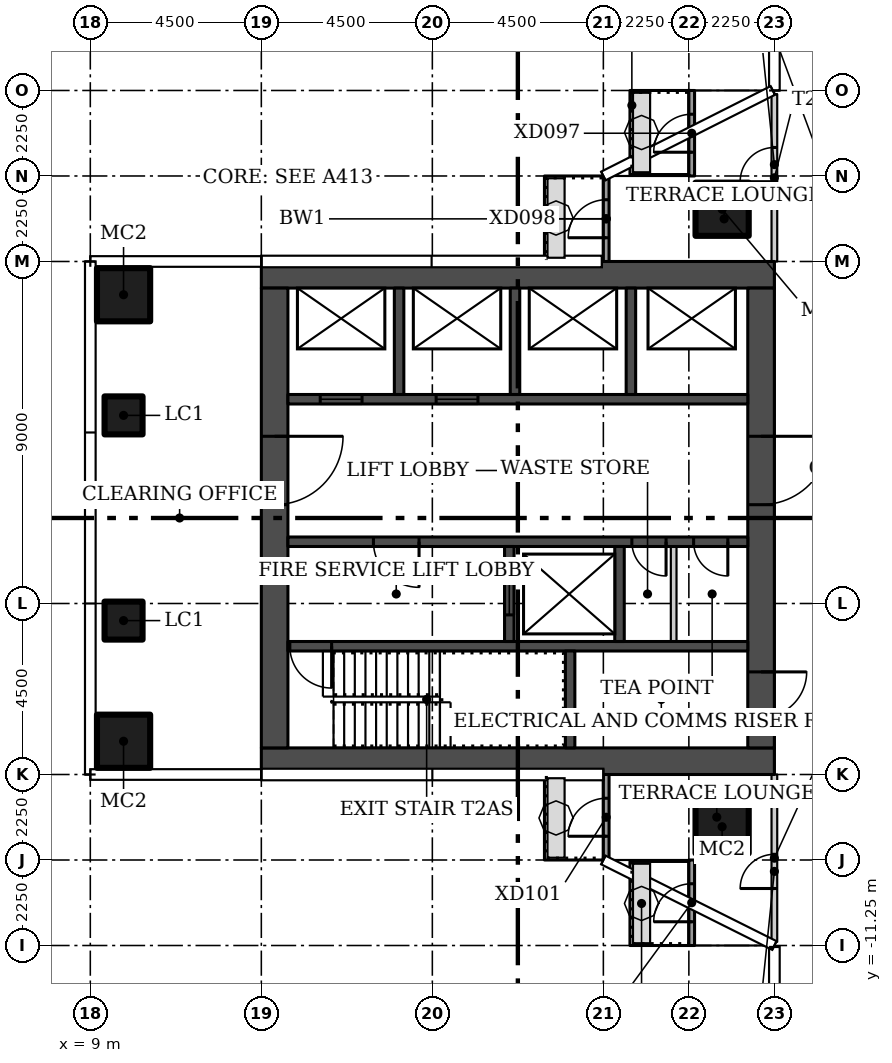
"""IFC4 building model, lengths in metres.
Left out: names, types, materials, properties, quantities, classifications, styles, units other than length and angle.
Written with IfcOpenShell. Run it as: python <this file> out.ifc"""

import sys

from ifc_helpers import new_model, si_unit, direction, frame, frame_2d, origin, origin_2d, place, context, subcontext, project, spatial, rectangle, hollow_rectangle, extrude, element, fill, save


model = new_model("IFC4")
c1 = context("Model", 3, precision=1e-05, world=origin(), true_north=direction((0.0, 1.0)))
c2 = subcontext(c1, "Body", "Model", "MODEL_VIEW")
j1 = project(units=[si_unit("LENGTHUNIT", "METRE"), si_unit("PLANEANGLEUNIT", "RADIAN")], contexts=[c1])
p1 = place(None, origin())
s1 = spatial("IfcSite", under=j1, at=p1, CompositionType="ELEMENT")
p2 = place(p1, origin())
s2 = spatial("IfcBuilding", under=s1, at=p2, CompositionType="ELEMENT")
p3 = place(p2, frame((0.0, 0.0, 73.2)))
s3 = spatial("IfcBuildingStorey", under=s2, at=p3, CompositionType="ELEMENT", Elevation=73.2)
for number, where in (
    (1, (25.625, 8.125, 0.0)),
    (2, (25.625, -8.125, 0.0)),
    (3, (9.875, -5.875, 0.0)),
    (4, (9.875, 5.875, 0.0)),
):
    element("IfcColumn", number, at=place(p3, frame(where)), inside=s3, PredefinedType="COLUMN", context=c2, shape_type="SweptSolid", body=[
        extrude(hollow_rectangle(XDim=1.4, YDim=1.4, WallThickness=0.05, at=origin_2d()), origin(), (0.0, 0.0, 1.0), 3.45),
    ])
for number, where in (
    (5, (9.875, -2.7, 0.0)),
    (6, (9.875, 2.7, 0.0)),
):
    element("IfcColumn", number, at=place(p3, frame(where)), inside=s3, PredefinedType="COLUMN", context=c2, shape_type="SweptSolid", body=[
        extrude(hollow_rectangle(XDim=1.0, YDim=1.0, WallThickness=0.04, at=origin_2d()), origin(), (0.0, 0.0, 1.0), 3.45),
    ])
p4 = place(p3, frame((27.0, 6.75, 0.0), z_axis=(0.0, 0.0, 1.0), x_axis=(0.0, 1.0, 0.0)))
e7 = element("IfcWall", 7, at=p4, inside=s3, PredefinedType="PARTITIONING", context=c2, shape_type="SweptSolid", body=[
    extrude(rectangle(XDim=4.405, YDim=0.15, at=frame_2d((2.203, 0.0))), origin(), (0.0, 0.0, 1.0), 3.45),
])
p5 = place(p4, frame((2.1, 0.0, 0.0)))
e8 = element("IfcOpeningElement", 8, at=p5, cuts=e7, PredefinedType="OPENING", context=c2, shape_type="SweptSolid", body=[
    extrude(rectangle(XDim=0.9, YDim=2.1, at=frame_2d((0.45, 1.05))), frame((0.0, 0.085, 0.0), z_axis=(0.0, -1.0, 0.0), x_axis=(1.0, 0.0, 0.0)), (0.0, 0.0, 1.0), 0.17),
])
p6 = place(p3, frame((27.0, -11.155, 0.0), z_axis=(0.0, 0.0, 1.0), x_axis=(0.0, 1.0, 0.0)))
e9 = element("IfcWall", 9, at=p6, inside=s3, PredefinedType="PARTITIONING", context=c2, shape_type="SweptSolid", body=[
    extrude(rectangle(XDim=4.405, YDim=0.15, at=frame_2d((2.203, 0.0))), origin(), (0.0, 0.0, 1.0), 3.45),
])
p7 = place(p6, frame((1.405, 0.0, 0.0)))
e10 = element("IfcOpeningElement", 10, at=p7, cuts=e9, PredefinedType="OPENING", context=c2, shape_type="SweptSolid", body=[
    extrude(rectangle(XDim=0.9, YDim=2.1, at=frame_2d((0.45, 1.05))), frame((0.0, 0.085, 0.0), z_axis=(0.0, -1.0, 0.0), x_axis=(1.0, 0.0, 0.0)), (0.0, 0.0, 1.0), 0.17),
])
p8 = place(p3, frame((24.825, 9.0, 0.0), z_axis=(0.0, 0.0, 1.0), x_axis=(0.0, 1.0, 0.0)))
e11 = element("IfcWall", 11, at=p8, inside=s3, PredefinedType="SOLIDWALL", context=c2, shape_type="SweptSolid", body=[
    extrude(rectangle(XDim=2.25, YDim=0.15, at=frame_2d((1.125, 0.0))), origin(), (0.0, 0.0, 1.0), 3.45),
])
p9 = place(p8, frame((0.625, 0.0, 0.0)))
e12 = element("IfcOpeningElement", 12, at=p9, cuts=e11, PredefinedType="OPENING", context=c2, shape_type="SweptSolid", body=[
    extrude(rectangle(XDim=1.0, YDim=2.4, at=frame_2d((0.5, 1.2))), frame((0.0, 0.085, 0.0), z_axis=(0.0, -1.0, 0.0), x_axis=(1.0, 0.0, 0.0)), (0.0, 0.0, 1.0), 0.17),
])
p10 = place(p3, frame((22.575, 6.743, 0.0), z_axis=(0.0, 0.0, 1.0), x_axis=(0.0, 1.0, 0.0)))
e13 = element("IfcWall", 13, at=p10, inside=s3, PredefinedType="SOLIDWALL", context=c2, shape_type="SweptSolid", body=[
    extrude(rectangle(XDim=2.257, YDim=0.15, at=frame_2d((1.128, 0.0))), origin(), (0.0, 0.0, 1.0), 3.45),
])
p11 = place(p10, frame((0.632, 0.0, 0.0)))
e14 = element("IfcOpeningElement", 14, at=p11, cuts=e13, PredefinedType="OPENING", context=c2, shape_type="SweptSolid", body=[
    extrude(rectangle(XDim=1.0, YDim=2.4, at=frame_2d((0.5, 1.2))), frame((0.0, 0.085, 0.0), z_axis=(0.0, -1.0, 0.0), x_axis=(1.0, 0.0, 0.0)), (0.0, 0.0, 1.0), 0.17),
])
p12 = place(p3, frame((22.575, -9.0, 0.0), z_axis=(0.0, 0.0, 1.0), x_axis=(0.0, 1.0, 0.0)))
e15 = element("IfcWall", 15, at=p12, inside=s3, PredefinedType="SOLIDWALL", context=c2, shape_type="SweptSolid", body=[
    extrude(rectangle(XDim=2.257, YDim=0.15, at=frame_2d((1.128, 0.0))), origin(), (0.0, 0.0, 1.0), 3.45),
])
p13 = place(p12, frame((0.625, 0.0, 0.0)))
e16 = element("IfcOpeningElement", 16, at=p13, cuts=e15, PredefinedType="OPENING", context=c2, shape_type="SweptSolid", body=[
    extrude(rectangle(XDim=1.0, YDim=2.4, at=frame_2d((0.5, 1.2))), frame((0.0, 0.085, 0.0), z_axis=(0.0, -1.0, 0.0), x_axis=(1.0, 0.0, 0.0)), (0.0, 0.0, 1.0), 0.17),
])
p14 = place(p3, frame((24.825, -11.25, 0.0), z_axis=(0.0, 0.0, 1.0), x_axis=(0.0, 1.0, 0.0)))
e17 = element("IfcWall", 17, at=p14, inside=s3, PredefinedType="SOLIDWALL", context=c2, shape_type="SweptSolid", body=[
    extrude(rectangle(XDim=2.25, YDim=0.15, at=frame_2d((1.125, 0.0))), origin(), (0.0, 0.0, 1.0), 3.45),
])
p15 = place(p14, frame((0.625, 0.0, 0.0)))
e18 = element("IfcOpeningElement", 18, at=p15, cuts=e17, PredefinedType="OPENING", context=c2, shape_type="SweptSolid", body=[
    extrude(rectangle(XDim=1.0, YDim=2.4, at=frame_2d((0.5, 1.2))), frame((0.0, 0.085, 0.0), z_axis=(0.0, -1.0, 0.0), x_axis=(1.0, 0.0, 0.0)), (0.0, 0.0, 1.0), 0.17),
])
for number, where in (
    (19, (13.5, -6.4, 0.0)),
    (20, (13.5, 6.4, 0.0)),
):
    element("IfcWall", number, at=place(p3, frame(where)), inside=s3, PredefinedType="SHEAR", context=c2, shape_type="SweptSolid", body=[
        extrude(rectangle(XDim=13.5, YDim=0.7, at=frame_2d((6.75, 0.0))), origin(), (0.0, 0.0, 1.0), 3.45),
    ])
p16 = place(p3, frame((13.85, 6.05, 0.0), z_axis=(0.0, 0.0, 1.0), x_axis=(0.0, -1.0, 0.0)))
e21 = element("IfcWall", 21, at=p16, inside=s3, PredefinedType="SHEAR", context=c2, shape_type="SweptSolid", body=[
    extrude(rectangle(XDim=12.1, YDim=0.7, at=frame_2d((6.05, 0.0))), origin(), (0.0, 0.0, 1.0), 3.45),
])
p17 = place(p16, frame((3.9, 0.0, 0.0)))
e22 = element("IfcOpeningElement", 22, at=p17, cuts=e21, PredefinedType="OPENING", context=c2, shape_type="SweptSolid", body=[
    extrude(rectangle(XDim=1.8, YDim=2.4, at=frame_2d((0.9, 1.2))), frame((0.0, 0.36, 0.0), z_axis=(0.0, -1.0, 0.0), x_axis=(1.0, 0.0, 0.0)), (0.0, 0.0, 1.0), 0.72),
])
p18 = place(p3, frame((26.65, 6.05, 0.0), z_axis=(0.0, 0.0, 1.0), x_axis=(0.0, -1.0, 0.0)))
e23 = element("IfcWall", 23, at=p18, inside=s3, PredefinedType="SHEAR", context=c2, shape_type="SweptSolid", body=[
    extrude(rectangle(XDim=12.1, YDim=0.7, at=frame_2d((6.05, 0.0))), origin(), (0.0, 0.0, 1.0), 3.45),
])
p19 = place(p18, frame((10.1, 0.0, 0.0)))
e24 = element("IfcOpeningElement", 24, at=p19, cuts=e23, PredefinedType="OPENING", context=c2, shape_type="SweptSolid", body=[
    extrude(rectangle(XDim=1.2, YDim=2.1, at=frame_2d((0.6, 1.05))), frame((0.0, 0.36, 0.0), z_axis=(0.0, -1.0, 0.0), x_axis=(1.0, 0.0, 0.0)), (0.0, 0.0, 1.0), 0.72),
])
p20 = place(p18, frame((3.9, 0.0, 0.0)))
e25 = element("IfcOpeningElement", 25, at=p20, cuts=e23, PredefinedType="OPENING", context=c2, shape_type="SweptSolid", body=[
    extrude(rectangle(XDim=1.8, YDim=2.4, at=frame_2d((0.9, 1.2))), frame((0.0, 0.36, 0.0), z_axis=(0.0, -1.0, 0.0), x_axis=(1.0, 0.0, 0.0)), (0.0, 0.0, 1.0), 0.72),
])
p21 = place(p3, frame((26.3, -3.375, 0.0), z_axis=(0.0, 0.0, 1.0), x_axis=(-1.0, 0.0, 0.0)))
e26 = element("IfcWall", 26, at=p21, inside=s3, PredefinedType="SHEAR", context=c2, shape_type="SweptSolid", body=[
    extrude(rectangle(XDim=12.1, YDim=0.25, at=frame_2d((6.05, 0.0))), origin(), (0.0, 0.0, 1.0), 3.45),
])
p22 = place(p21, frame((10.95, 0.0, 0.0)))
e27 = element("IfcOpeningElement", 27, at=p22, cuts=e26, PredefinedType="OPENING", context=c2, shape_type="SweptSolid", body=[
    extrude(rectangle(XDim=1.1, YDim=2.1, at=frame_2d((0.55, 1.05))), frame((0.0, 0.135, 0.0), z_axis=(0.0, -1.0, 0.0), x_axis=(1.0, 0.0, 0.0)), (0.0, 0.0, 1.0), 0.27),
])
p23 = place(p3, frame((21.625, -6.05, 0.0), z_axis=(0.0, 0.0, 1.0), x_axis=(0.0, 1.0, 0.0)))
e28 = element("IfcWall", 28, at=p23, inside=s3, PredefinedType="SHEAR", context=c2, shape_type="SweptSolid", body=[
    extrude(rectangle(XDim=2.55, YDim=0.25, at=frame_2d((1.275, 0.0))), origin(), (0.0, 0.0, 1.0), 3.45),
])
p24 = place(p3, frame((26.3, -0.625, 0.0), z_axis=(0.0, 0.0, 1.0), x_axis=(-1.0, 0.0, 0.0)))
e29 = element("IfcWall", 29, at=p24, inside=s3, PredefinedType="SHEAR", context=c2, shape_type="SweptSolid", body=[
    extrude(rectangle(XDim=12.1, YDim=0.25, at=frame_2d((6.05, 0.0))), origin(), (0.0, 0.0, 1.0), 3.45),
])
p25 = place(p24, frame((8.65, 0.0, 0.0)))
e30 = element("IfcOpeningElement", 30, at=p25, cuts=e29, PredefinedType="OPENING", context=c2, shape_type="SweptSolid", body=[
    extrude(rectangle(XDim=1.2, YDim=2.1, at=frame_2d((0.6, 1.05))), frame((0.0, 0.135, 0.0), z_axis=(0.0, -1.0, 0.0), x_axis=(1.0, 0.0, 0.0)), (0.0, 0.0, 1.0), 0.27),
])
p26 = place(p24, frame((2.15, 0.0, 0.0)))
e31 = element("IfcOpeningElement", 31, at=p26, cuts=e29, PredefinedType="OPENING", context=c2, shape_type="SweptSolid", body=[
    extrude(rectangle(XDim=0.9, YDim=2.1, at=frame_2d((0.45, 1.05))), frame((0.0, 0.135, 0.0), z_axis=(0.0, -1.0, 0.0), x_axis=(1.0, 0.0, 0.0)), (0.0, 0.0, 1.0), 0.27),
])
p27 = place(p24, frame((0.525, 0.0, 0.0)))
e32 = element("IfcOpeningElement", 32, at=p27, cuts=e29, PredefinedType="OPENING", context=c2, shape_type="SweptSolid", body=[
    extrude(rectangle(XDim=0.9, YDim=2.1, at=frame_2d((0.45, 1.05))), frame((0.0, 0.135, 0.0), z_axis=(0.0, -1.0, 0.0), x_axis=(1.0, 0.0, 0.0)), (0.0, 0.0, 1.0), 0.27),
])
p28 = place(p3, frame((20.025, -3.25, 0.0), z_axis=(0.0, 0.0, 1.0), x_axis=(0.0, 1.0, 0.0)))
e33 = element("IfcWall", 33, at=p28, inside=s3, PredefinedType="SHEAR", context=c2, shape_type="SweptSolid", body=[
    extrude(rectangle(XDim=2.5, YDim=0.25, at=frame_2d((1.25, 0.0))), origin(), (0.0, 0.0, 1.0), 3.45),
])
p29 = place(p28, frame((0.7, 0.0, 0.0)))
e34 = element("IfcOpeningElement", 34, at=p29, cuts=e33, PredefinedType="OPENING", context=c2, shape_type="SweptSolid", body=[
    extrude(rectangle(XDim=1.1, YDim=2.1, at=frame_2d((0.55, 1.05))), frame((0.0, 0.135, 0.0), z_axis=(0.0, -1.0, 0.0), x_axis=(1.0, 0.0, 0.0)), (0.0, 0.0, 1.0), 0.27),
])
p30 = place(p3, frame((22.925, -3.25, 0.0), z_axis=(0.0, 0.0, 1.0), x_axis=(0.0, 1.0, 0.0)))
e35 = element("IfcWall", 35, at=p30, inside=s3, PredefinedType="SHEAR", context=c2, shape_type="SweptSolid", body=[
    extrude(rectangle(XDim=2.5, YDim=0.25, at=frame_2d((1.25, 0.0))), origin(), (0.0, 0.0, 1.0), 3.45),
])
p31 = place(p3, frame((24.35, -3.25, 0.0), z_axis=(0.0, 0.0, 1.0), x_axis=(0.0, 1.0, 0.0)))
e36 = element("IfcWall", 36, at=p31, inside=s3, PredefinedType="PARTITIONING", context=c2, shape_type="SweptSolid", body=[
    extrude(rectangle(XDim=2.5, YDim=0.15, at=frame_2d((1.25, 0.0))), origin(), (0.0, 0.0, 1.0), 3.45),
])
p32 = place(p3, frame((14.2, 3.125, 0.0)))
e37 = element("IfcWall", 37, at=p32, inside=s3, PredefinedType="SHEAR", context=c2, shape_type="SweptSolid", body=[
    extrude(rectangle(XDim=12.1, YDim=0.25, at=frame_2d((6.05, 0.0))), origin(), (0.0, 0.0, 1.0), 3.45),
])
p33 = place(p32, frame((0.85, 0.0, 0.0)))
e38 = element("IfcOpeningElement", 38, at=p33, cuts=e37, PredefinedType="OPENING", context=c2, shape_type="SweptSolid", body=[
    extrude(rectangle(XDim=1.1, YDim=2.1, at=frame_2d((0.55, 1.05))), frame((0.0, 0.135, 0.0), z_axis=(0.0, -1.0, 0.0), x_axis=(1.0, 0.0, 0.0)), (0.0, 0.0, 1.0), 0.27),
])
p34 = place(p32, frame((3.9, 0.0, 0.0)))
e39 = element("IfcOpeningElement", 39, at=p34, cuts=e37, PredefinedType="OPENING", context=c2, shape_type="SweptSolid", body=[
    extrude(rectangle(XDim=1.1, YDim=2.1, at=frame_2d((0.55, 1.05))), frame((0.0, 0.135, 0.0), z_axis=(0.0, -1.0, 0.0), x_axis=(1.0, 0.0, 0.0)), (0.0, 0.0, 1.0), 0.27),
])
for number, where, z_axis, x_axis in (
    (40, (17.125, 3.25, 0.0), (0.0, 0.0, 1.0), (0.0, 1.0, 0.0)),
    (41, (20.175, 3.25, 0.0), (0.0, 0.0, 1.0), (0.0, 1.0, 0.0)),
    (42, (23.225, 3.25, 0.0), (0.0, 0.0, 1.0), (0.0, 1.0, 0.0)),
):
    element("IfcWall", number, at=place(p3, frame(where, z_axis=z_axis, x_axis=x_axis)), inside=s3, PredefinedType="SHEAR", context=c2, shape_type="SweptSolid", body=[
        extrude(rectangle(XDim=2.8, YDim=0.25, at=frame_2d((1.4, 0.0))), origin(), (0.0, 0.0, 1.0), 3.45),
    ])
p35 = place(p7, origin())
e43 = element("IfcDoor", 43, at=p35, inside=s3, OperationType="SINGLE_SWING_LEFT", PredefinedType="DOOR", context=c2, shape_type="SweptSolid", body=[
    extrude(rectangle(XDim=0.9, YDim=2.1, at=frame_2d((0.45, 1.05))), frame((0.0, 0.025, 0.0), z_axis=(0.0, -1.0, 0.0), x_axis=(1.0, 0.0, 0.0)), (0.0, 0.0, 1.0), 0.05),
])
fill(e10, e43)
p36 = place(p5, origin())
e44 = element("IfcDoor", 44, at=p36, inside=s3, OperationType="SINGLE_SWING_RIGHT", PredefinedType="DOOR", context=c2, shape_type="SweptSolid", body=[
    extrude(rectangle(XDim=0.9, YDim=2.1, at=frame_2d((0.45, 1.05))), frame((0.0, 0.025, 0.0), z_axis=(0.0, -1.0, 0.0), x_axis=(1.0, 0.0, 0.0)), (0.0, 0.0, 1.0), 0.05),
])
fill(e8, e44)
p37 = place(p9, origin())
e45 = element("IfcDoor", 45, at=p37, inside=s3, OperationType="SINGLE_SWING_RIGHT", PredefinedType="DOOR", context=c2, shape_type="SweptSolid", body=[
    extrude(rectangle(XDim=1.0, YDim=2.4, at=frame_2d((0.5, 1.2))), frame((0.0, 0.025, 0.0), z_axis=(0.0, -1.0, 0.0), x_axis=(1.0, 0.0, 0.0)), (0.0, 0.0, 1.0), 0.05),
])
fill(e12, e45)
p38 = place(p11, origin())
e46 = element("IfcDoor", 46, at=p38, inside=s3, OperationType="SINGLE_SWING_LEFT", PredefinedType="DOOR", context=c2, shape_type="SweptSolid", body=[
    extrude(rectangle(XDim=1.0, YDim=2.4, at=frame_2d((0.5, 1.2))), frame((0.0, 0.025, 0.0), z_axis=(0.0, -1.0, 0.0), x_axis=(1.0, 0.0, 0.0)), (0.0, 0.0, 1.0), 0.05),
])
fill(e14, e46)
p39 = place(p13, origin())
e47 = element("IfcDoor", 47, at=p39, inside=s3, OperationType="SINGLE_SWING_LEFT", PredefinedType="DOOR", context=c2, shape_type="SweptSolid", body=[
    extrude(rectangle(XDim=1.0, YDim=2.4, at=frame_2d((0.5, 1.2))), frame((0.0, 0.025, 0.0), z_axis=(0.0, -1.0, 0.0), x_axis=(1.0, 0.0, 0.0)), (0.0, 0.0, 1.0), 0.05),
])
fill(e16, e47)
p40 = place(p15, origin())
e48 = element("IfcDoor", 48, at=p40, inside=s3, OperationType="SINGLE_SWING_RIGHT", PredefinedType="DOOR", context=c2, shape_type="SweptSolid", body=[
    extrude(rectangle(XDim=1.0, YDim=2.4, at=frame_2d((0.5, 1.2))), frame((0.0, 0.025, 0.0), z_axis=(0.0, -1.0, 0.0), x_axis=(1.0, 0.0, 0.0)), (0.0, 0.0, 1.0), 0.05),
])
fill(e18, e48)
p41 = place(p17, origin())
e49 = element("IfcDoor", 49, at=p41, inside=s3, OperationType="DOUBLE_DOOR_SINGLE_SWING", PredefinedType="DOOR", context=c2, shape_type="SweptSolid", body=[
    extrude(rectangle(XDim=1.8, YDim=2.4, at=frame_2d((0.9, 1.2))), frame((0.0, 0.025, 0.0), z_axis=(0.0, -1.0, 0.0), x_axis=(1.0, 0.0, 0.0)), (0.0, 0.0, 1.0), 0.05),
])
fill(e22, e49)
p42 = place(p19, origin())
e50 = element("IfcDoor", 50, at=p42, inside=s3, OperationType="SINGLE_SWING_RIGHT", PredefinedType="DOOR", context=c2, shape_type="SweptSolid", body=[
    extrude(rectangle(XDim=1.2, YDim=2.1, at=frame_2d((0.6, 1.05))), frame((0.0, 0.025, 0.0), z_axis=(0.0, -1.0, 0.0), x_axis=(1.0, 0.0, 0.0)), (0.0, 0.0, 1.0), 0.05),
])
fill(e24, e50)
p43 = place(p20, origin())
e51 = element("IfcDoor", 51, at=p43, inside=s3, OperationType="DOUBLE_DOOR_SINGLE_SWING", PredefinedType="DOOR", context=c2, shape_type="SweptSolid", body=[
    extrude(rectangle(XDim=1.8, YDim=2.4, at=frame_2d((0.9, 1.2))), frame((0.0, 0.025, 0.0), z_axis=(0.0, -1.0, 0.0), x_axis=(1.0, 0.0, 0.0)), (0.0, 0.0, 1.0), 0.05),
])
fill(e25, e51)
p44 = place(p22, origin())
e52 = element("IfcDoor", 52, at=p44, inside=s3, OperationType="SINGLE_SWING_RIGHT", PredefinedType="DOOR", context=c2, shape_type="SweptSolid", body=[
    extrude(rectangle(XDim=1.1, YDim=2.1, at=frame_2d((0.55, 1.05))), frame((0.0, 0.025, 0.0), z_axis=(0.0, -1.0, 0.0), x_axis=(1.0, 0.0, 0.0)), (0.0, 0.0, 1.0), 0.05),
])
fill(e27, e52)
p45 = place(p25, origin())
e53 = element("IfcDoor", 53, at=p45, inside=s3, OperationType="SINGLE_SWING_RIGHT", PredefinedType="DOOR", context=c2, shape_type="SweptSolid", body=[
    extrude(rectangle(XDim=1.2, YDim=2.1, at=frame_2d((0.6, 1.05))), frame((0.0, 0.025, 0.0), z_axis=(0.0, -1.0, 0.0), x_axis=(1.0, 0.0, 0.0)), (0.0, 0.0, 1.0), 0.05),
])
fill(e30, e53)
p46 = place(p26, origin())
e54 = element("IfcDoor", 54, at=p46, inside=s3, OperationType="SINGLE_SWING_LEFT", PredefinedType="DOOR", context=c2, shape_type="SweptSolid", body=[
    extrude(rectangle(XDim=0.9, YDim=2.1, at=frame_2d((0.45, 1.05))), frame((0.0, 0.025, 0.0), z_axis=(0.0, -1.0, 0.0), x_axis=(1.0, 0.0, 0.0)), (0.0, 0.0, 1.0), 0.05),
])
fill(e31, e54)
p47 = place(p27, origin())
e55 = element("IfcDoor", 55, at=p47, inside=s3, OperationType="SINGLE_SWING_LEFT", PredefinedType="DOOR", context=c2, shape_type="SweptSolid", body=[
    extrude(rectangle(XDim=0.9, YDim=2.1, at=frame_2d((0.45, 1.05))), frame((0.0, 0.025, 0.0), z_axis=(0.0, -1.0, 0.0), x_axis=(1.0, 0.0, 0.0)), (0.0, 0.0, 1.0), 0.05),
])
fill(e32, e55)
p48 = place(p29, origin())
e56 = element("IfcDoor", 56, at=p48, inside=s3, OperationType="SLIDING_TO_LEFT", PredefinedType="DOOR", context=c2, shape_type="SweptSolid", body=[
    extrude(rectangle(XDim=1.1, YDim=2.1, at=frame_2d((0.55, 1.05))), frame((0.0, 0.025, 0.0), z_axis=(0.0, -1.0, 0.0), x_axis=(1.0, 0.0, 0.0)), (0.0, 0.0, 1.0), 0.05),
])
fill(e34, e56)
p49 = place(p33, origin())
e57 = element("IfcDoor", 57, at=p49, inside=s3, OperationType="SLIDING_TO_LEFT", PredefinedType="DOOR", context=c2, shape_type="SweptSolid", body=[
    extrude(rectangle(XDim=1.1, YDim=2.1, at=frame_2d((0.55, 1.05))), frame((0.0, 0.025, 0.0), z_axis=(0.0, -1.0, 0.0), x_axis=(1.0, 0.0, 0.0)), (0.0, 0.0, 1.0), 0.05),
])
fill(e38, e57)
p50 = place(p34, origin())
e58 = element("IfcDoor", 58, at=p50, inside=s3, OperationType="SLIDING_TO_LEFT", PredefinedType="DOOR", context=c2, shape_type="SweptSolid", body=[
    extrude(rectangle(XDim=1.1, YDim=2.1, at=frame_2d((0.55, 1.05))), frame((0.0, 0.025, 0.0), z_axis=(0.0, -1.0, 0.0), x_axis=(1.0, 0.0, 0.0)), (0.0, 0.0, 1.0), 0.05),
])
fill(e39, e58)
save(model, sys.argv[1])
